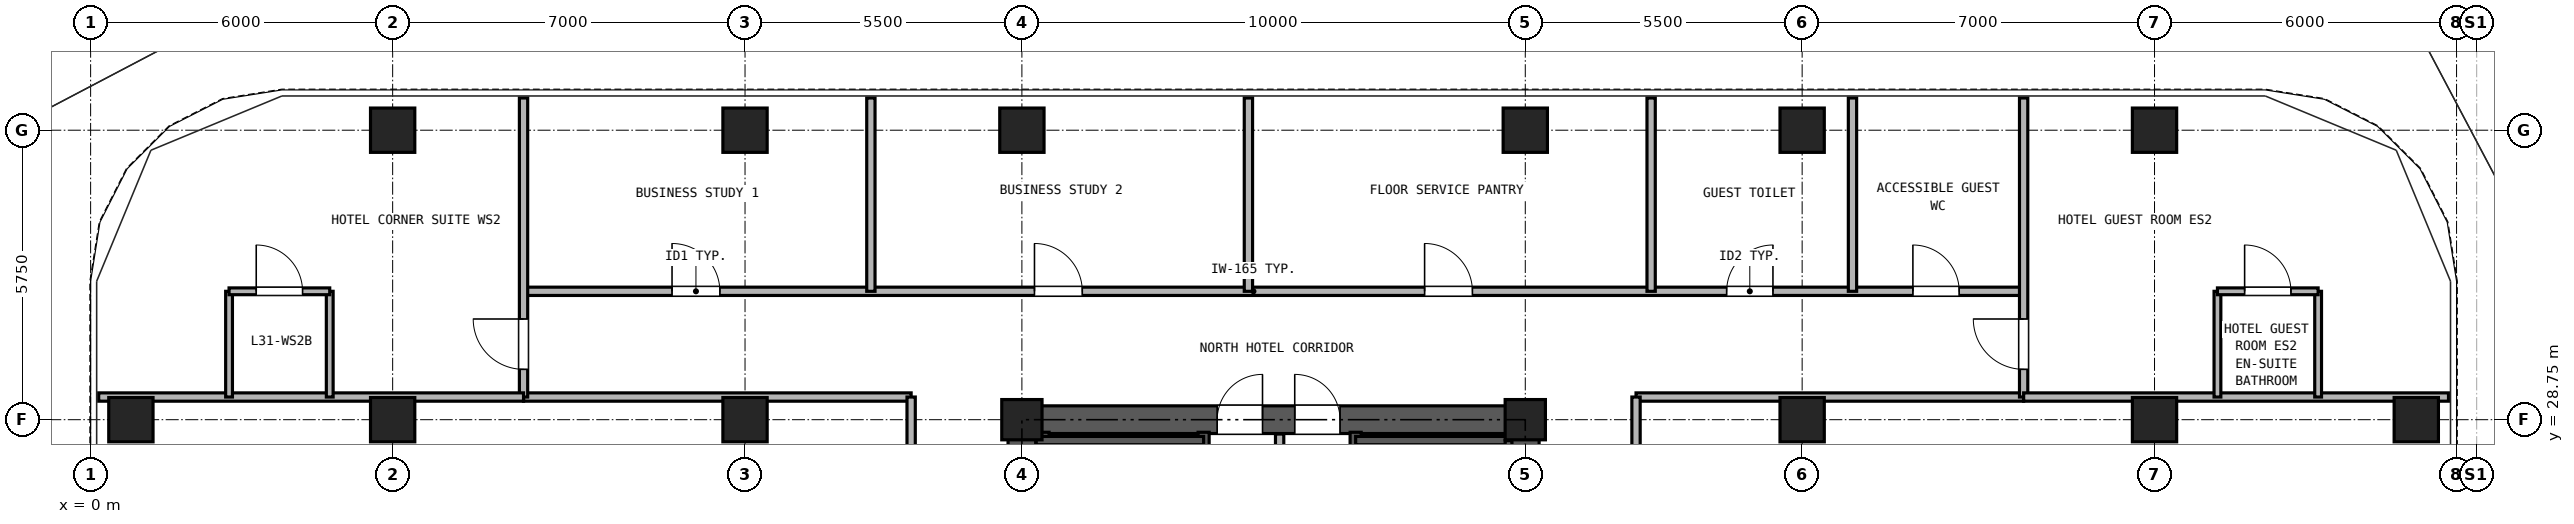
"""IFC4 building model, lengths in metres.
Left out: names, types, materials, properties, quantities, classifications, styles, units other than length and angle.
Written with IfcOpenShell. Run it as: python <this file> out.ifc"""

import sys

from ifc_helpers import new_model, si_unit, direction, frame, frame_2d, origin, origin_2d, place, context, subcontext, project, spatial, rectangle, hollow_rectangle, extrude, source, transform, mapped, element, fill, save


model = new_model("IFC4")
c1 = context("Model", 3, precision=1e-05, world=origin(), true_north=direction((0.0, 1.0)))
c2 = subcontext(c1, "Body", "Model", "MODEL_VIEW")
j1 = project(units=[si_unit("LENGTHUNIT", "METRE"), si_unit("PLANEANGLEUNIT", "RADIAN")], contexts=[c1])
p1 = place(None, origin())
s1 = spatial("IfcSite", under=j1, at=p1, CompositionType="ELEMENT")
p2 = place(p1, origin())
s2 = spatial("IfcBuilding", under=s1, at=p2, CompositionType="ELEMENT")
p3 = place(p2, frame((0.0, 0.0, 115.1)))
s3 = spatial("IfcBuildingStorey", under=s2, at=p3, CompositionType="ELEMENT", Elevation=115.1)
m1 = source(origin(), c2, "Body", "SweptSolid", [
    extrude(hollow_rectangle(XDim=0.88, YDim=0.88, WallThickness=0.05, at=origin_2d()), origin(), (0.0, 0.0, 1.0), 2.95),
])
for number, where, z_axis, x_axis in (
    (1, (6.0, 34.5, 0.0), (0.0, 0.0, 1.0), (1.0, 0.0, 0.0)),
    (2, (13.0, 34.5, 0.0), (0.0, 0.0, 1.0), (1.0, 0.0, 0.0)),
    (3, (18.5, 34.5, 0.0), (0.0, 0.0, 1.0), (1.0, 0.0, 0.0)),
    (4, (28.5, 34.5, 0.0), (0.0, 0.0, 1.0), (1.0, 0.0, 0.0)),
    (5, (34.0, 34.5, 0.0), (0.0, 0.0, 1.0), (1.0, 0.0, 0.0)),
    (6, (41.0, 34.5, 0.0), (0.0, 0.0, 1.0), (1.0, 0.0, 0.0)),
    (7, (0.8, 28.75, 0.0), (0.0, 0.0, 1.0), (1.0, 0.0, 0.0)),
    (8, (46.2, 28.75, 0.0), (0.0, 0.0, 1.0), (1.0, 0.0, 0.0)),
    (9, (6.0, 28.75, 0.0), (0.0, 0.0, 1.0), (1.0, 0.0, 0.0)),
    (10, (13.0, 28.75, 0.0), (0.0, 0.0, 1.0), (1.0, 0.0, 0.0)),
):
    element("IfcColumn", number, at=place(p3, frame(where, z_axis=z_axis, x_axis=x_axis)), inside=s3, PredefinedType="COLUMN", context=c2, shape_type="MappedRepresentation", body=[
        mapped(m1, transform((0.0, 0.0, 0.0), x_axis=(1.0, 0.0, 0.0), y_axis=(0.0, 1.0, 0.0), z_axis=(0.0, 0.0, 1.0), scale=1.0)),
    ])
m2 = source(origin(), c2, "Body", "SweptSolid", [
    extrude(hollow_rectangle(XDim=0.8, YDim=0.8, WallThickness=0.045, at=origin_2d()), origin(), (0.0, 0.0, 1.0), 2.95),
])
for number, where, z_axis, x_axis in (
    (11, (18.5, 28.75, 0.0), (0.0, 0.0, 1.0), (1.0, 0.0, 0.0)),
    (12, (28.5, 28.75, 0.0), (0.0, 0.0, 1.0), (1.0, 0.0, 0.0)),
):
    element("IfcColumn", number, at=place(p3, frame(where, z_axis=z_axis, x_axis=x_axis)), inside=s3, PredefinedType="COLUMN", context=c2, shape_type="MappedRepresentation", body=[
        mapped(m2, transform((0.0, 0.0, 0.0), x_axis=(1.0, 0.0, 0.0), y_axis=(0.0, 1.0, 0.0), z_axis=(0.0, 0.0, 1.0), scale=1.0)),
    ])
for number, where, z_axis, x_axis in (
    (13, (34.0, 28.75, 0.0), (0.0, 0.0, 1.0), (1.0, 0.0, 0.0)),
    (14, (41.0, 28.75, 0.0), (0.0, 0.0, 1.0), (1.0, 0.0, 0.0)),
):
    element("IfcColumn", number, at=place(p3, frame(where, z_axis=z_axis, x_axis=x_axis)), inside=s3, PredefinedType="COLUMN", context=c2, shape_type="MappedRepresentation", body=[
        mapped(m1, transform((0.0, 0.0, 0.0), x_axis=(1.0, 0.0, 0.0), y_axis=(0.0, 1.0, 0.0), z_axis=(0.0, 0.0, 1.0), scale=1.0)),
    ])
p4 = place(p3, frame((18.225, 28.75, 0.0), z_axis=(0.0, 0.0, 1.0), x_axis=(1.0, 0.0, 0.0)))
e15 = element("IfcWall", 15, at=p4, inside=s3, PredefinedType="SHEAR", context=c2, shape_type="SweptSolid", body=[
    extrude(rectangle(XDim=10.55, YDim=0.55, at=frame_2d((5.275, 0.0))), origin(), (0.0, 0.0, 1.0), 2.95),
])
p5 = place(p4, frame((4.155, 0.0, 0.0)))
e16 = element("IfcOpeningElement", 16, at=p5, cuts=e15, PredefinedType="OPENING", context=c2, shape_type="SweptSolid", body=[
    extrude(rectangle(XDim=0.9, YDim=2.05, at=frame_2d((0.45, 1.025))), frame((0.0, 0.285, 0.0), z_axis=(0.0, -1.0, 0.0), x_axis=(1.0, 0.0, 0.0)), (0.0, 0.0, 1.0), 0.57),
])
p6 = place(p4, frame((5.695, 0.0, 0.0)))
e17 = element("IfcOpeningElement", 17, at=p6, cuts=e15, PredefinedType="OPENING", context=c2, shape_type="SweptSolid", body=[
    extrude(rectangle(XDim=0.9, YDim=2.05, at=frame_2d((0.45, 1.025))), frame((0.0, 0.285, 0.0), z_axis=(0.0, -1.0, 0.0), x_axis=(1.0, 0.0, 0.0)), (0.0, 0.0, 1.0), 0.57),
])
p7 = place(p3, frame((18.5, 11.775, 0.0), z_axis=(0.0, 0.0, 1.0), x_axis=(0.0, 1.0, 0.0)))
e18 = element("IfcWall", 18, at=p7, inside=s3, PredefinedType="SHEAR", context=c2, shape_type="SweptSolid", body=[
    extrude(rectangle(XDim=16.7, YDim=0.55, at=frame_2d((8.35, 0.0))), origin(), (0.0, 0.0, 1.0), 2.95),
])
p8 = place(p7, frame((7.375, 0.0, 0.0)))
e19 = element("IfcOpeningElement", 19, at=p8, cuts=e18, PredefinedType="OPENING", context=c2, shape_type="SweptSolid", body=[
    extrude(rectangle(XDim=1.15, YDim=2.2, at=frame_2d((0.575, 1.1))), frame((0.0, 0.285, 0.0), z_axis=(0.0, -1.0, 0.0), x_axis=(1.0, 0.0, 0.0)), (0.0, 0.0, 1.0), 0.57),
])
p9 = place(p3, frame((28.5, 11.775, 0.0), z_axis=(0.0, 0.0, 1.0), x_axis=(0.0, 1.0, 0.0)))
e20 = element("IfcWall", 20, at=p9, inside=s3, PredefinedType="SHEAR", context=c2, shape_type="SweptSolid", body=[
    extrude(rectangle(XDim=16.7, YDim=0.55, at=frame_2d((8.35, 0.0))), origin(), (0.0, 0.0, 1.0), 2.95),
])
p10 = place(p9, frame((7.375, 0.0, 0.0)))
e21 = element("IfcOpeningElement", 21, at=p10, cuts=e20, PredefinedType="OPENING", context=c2, shape_type="SweptSolid", body=[
    extrude(rectangle(XDim=1.15, YDim=2.2, at=frame_2d((0.575, 1.1))), frame((0.0, 0.285, 0.0), z_axis=(0.0, -1.0, 0.0), x_axis=(1.0, 0.0, 0.0)), (0.0, 0.0, 1.0), 0.57),
])
for number, where, z_axis, x_axis in (
    (22, (18.93, 21.39, 0.0), (0.0, 0.0, 1.0), (0.0, 1.0, 0.0)),
    (23, (22.11, 21.39, 0.0), (0.0, 0.0, 1.0), (0.0, 1.0, 0.0)),
    (24, (25.13, 21.39, 0.0), (0.0, 0.0, 1.0), (0.0, 1.0, 0.0)),
):
    element("IfcWall", number, at=place(p3, frame(where, z_axis=z_axis, x_axis=x_axis)), inside=s3, PredefinedType="SOLIDWALL", context=c2, shape_type="SweptSolid", body=[
        extrude(rectangle(XDim=7.11, YDim=0.22, at=frame_2d((3.555, 0.0))), origin(), (0.0, 0.0, 1.0), 2.95),
    ])
p11 = place(p3, frame((18.785, 28.335, 0.0), z_axis=(0.0, 0.0, 1.0), x_axis=(1.0, 0.0, 0.0)))
e25 = element("IfcWall", 25, at=p11, inside=s3, PredefinedType="PARTITIONING", context=c2, shape_type="SweptSolid", body=[
    extrude(rectangle(XDim=3.325, YDim=0.165, at=frame_2d((1.663, 0.0))), origin(), (0.0, 0.0, 1.0), 2.95),
])
p12 = place(p3, frame((25.13, 28.335, 0.0), z_axis=(0.0, 0.0, 1.0), x_axis=(1.0, 0.0, 0.0)))
e26 = element("IfcWall", 26, at=p12, inside=s3, PredefinedType="PARTITIONING", context=c2, shape_type="SweptSolid", body=[
    extrude(rectangle(XDim=3.085, YDim=0.165, at=frame_2d((1.542, 0.0))), origin(), (0.0, 0.0, 1.0), 2.95),
])
p13 = place(p3, frame((28.167, 21.39, 0.0), z_axis=(0.0, 0.0, 1.0), x_axis=(0.0, 1.0, 0.0)))
e27 = element("IfcWall", 27, at=p13, inside=s3, PredefinedType="PARTITIONING", context=c2, shape_type="SweptSolid", body=[
    extrude(rectangle(XDim=6.945, YDim=0.135, at=frame_2d((3.473, 0.0))), origin(), (0.0, 0.0, 1.0), 2.95),
])
p14 = place(p3, frame((23.62, 24.4, 0.0), z_axis=(0.0, 0.0, 1.0), x_axis=(0.0, 1.0, 0.0)))
e28 = element("IfcWall", 28, at=p14, inside=s3, PredefinedType="PARTITIONING", context=c2, shape_type="SweptSolid", body=[
    extrude(rectangle(XDim=4.065, YDim=0.165, at=frame_2d((2.033, 0.0))), origin(), (0.0, 0.0, 1.0), 2.95),
])
p15 = place(p3, frame((8.6, 31.3, 0.0), z_axis=(0.0, 0.0, 1.0), x_axis=(1.0, 0.0, 0.0)))
e29 = element("IfcWall", 29, at=p15, inside=s3, PredefinedType="PARTITIONING", context=c2, shape_type="SweptSolid", body=[
    extrude(rectangle(XDim=29.8, YDim=0.165, at=frame_2d((14.9, 0.0))), origin(), (0.0, 0.0, 1.0), 2.95),
])
p16 = place(p15, frame((2.95, 0.0, 0.0)))
e30 = element("IfcOpeningElement", 30, at=p16, cuts=e29, PredefinedType="OPENING", context=c2, shape_type="SweptSolid", body=[
    extrude(rectangle(XDim=0.95, YDim=2.15, at=frame_2d((0.475, 1.075))), frame((0.0, 0.093, 0.0), z_axis=(0.0, -1.0, 0.0), x_axis=(1.0, 0.0, 0.0)), (0.0, 0.0, 1.0), 0.185),
])
p17 = place(p15, frame((10.15, 0.0, 0.0)))
e31 = element("IfcOpeningElement", 31, at=p17, cuts=e29, PredefinedType="OPENING", context=c2, shape_type="SweptSolid", body=[
    extrude(rectangle(XDim=0.95, YDim=2.15, at=frame_2d((0.475, 1.075))), frame((0.0, 0.093, 0.0), z_axis=(0.0, -1.0, 0.0), x_axis=(1.0, 0.0, 0.0)), (0.0, 0.0, 1.0), 0.185),
])
p18 = place(p15, frame((17.9, 0.0, 0.0)))
e32 = element("IfcOpeningElement", 32, at=p18, cuts=e29, PredefinedType="OPENING", context=c2, shape_type="SweptSolid", body=[
    extrude(rectangle(XDim=0.95, YDim=2.15, at=frame_2d((0.475, 1.075))), frame((0.0, 0.093, 0.0), z_axis=(0.0, -1.0, 0.0), x_axis=(1.0, 0.0, 0.0)), (0.0, 0.0, 1.0), 0.185),
])
p19 = place(p15, frame((23.9, 0.0, 0.0)))
e33 = element("IfcOpeningElement", 33, at=p19, cuts=e29, PredefinedType="OPENING", context=c2, shape_type="SweptSolid", body=[
    extrude(rectangle(XDim=0.92, YDim=2.1, at=frame_2d((0.46, 1.05))), frame((0.0, 0.093, 0.0), z_axis=(0.0, -1.0, 0.0), x_axis=(1.0, 0.0, 0.0)), (0.0, 0.0, 1.0), 0.185),
])
p20 = place(p15, frame((27.6, 0.0, 0.0)))
e34 = element("IfcOpeningElement", 34, at=p20, cuts=e29, PredefinedType="OPENING", context=c2, shape_type="SweptSolid", body=[
    extrude(rectangle(XDim=0.92, YDim=2.1, at=frame_2d((0.46, 1.05))), frame((0.0, 0.093, 0.0), z_axis=(0.0, -1.0, 0.0), x_axis=(1.0, 0.0, 0.0)), (0.0, 0.0, 1.0), 0.185),
])
for number, where, z_axis, x_axis in (
    (35, (8.6, 29.2, 0.0), (0.0, 0.0, 1.0), (1.0, 0.0, 0.0)),
    (36, (30.7, 29.2, 0.0), (0.0, 0.0, 1.0), (1.0, 0.0, 0.0)),
):
    element("IfcWall", number, at=place(p3, frame(where, z_axis=z_axis, x_axis=x_axis)), inside=s3, PredefinedType="PARTITIONING", context=c2, shape_type="SweptSolid", body=[
        extrude(rectangle(XDim=7.7, YDim=0.165, at=frame_2d((3.85, 0.0))), origin(), (0.0, 0.0, 1.0), 2.95),
    ])
p21 = place(p3, frame((16.3, 11.05, 0.0), z_axis=(0.0, 0.0, 1.0), x_axis=(0.0, 1.0, 0.0)))
e37 = element("IfcWall", 37, at=p21, inside=s3, PredefinedType="PARTITIONING", context=c2, shape_type="SweptSolid", body=[
    extrude(rectangle(XDim=18.15, YDim=0.165, at=frame_2d((9.075, 0.0))), origin(), (0.0, 0.0, 1.0), 2.95),
])
p22 = place(p21, frame((4.037, 0.0, 0.0)))
e38 = element("IfcOpeningElement", 38, at=p22, cuts=e37, PredefinedType="OPENING", context=c2, shape_type="SweptSolid", body=[
    extrude(rectangle(XDim=0.95, YDim=2.15, at=frame_2d((0.475, 1.075))), frame((0.0, 0.093, 0.0), z_axis=(0.0, -1.0, 0.0), x_axis=(1.0, 0.0, 0.0)), (0.0, 0.0, 1.0), 0.185),
])
p23 = place(p21, frame((13.113, 0.0, 0.0)))
e39 = element("IfcOpeningElement", 39, at=p23, cuts=e37, PredefinedType="OPENING", context=c2, shape_type="SweptSolid", body=[
    extrude(rectangle(XDim=0.95, YDim=2.15, at=frame_2d((0.475, 1.075))), frame((0.0, 0.093, 0.0), z_axis=(0.0, -1.0, 0.0), x_axis=(1.0, 0.0, 0.0)), (0.0, 0.0, 1.0), 0.185),
])
p24 = place(p3, frame((30.7, 11.05, 0.0), z_axis=(0.0, 0.0, 1.0), x_axis=(0.0, 1.0, 0.0)))
e40 = element("IfcWall", 40, at=p24, inside=s3, PredefinedType="PARTITIONING", context=c2, shape_type="SweptSolid", body=[
    extrude(rectangle(XDim=18.15, YDim=0.165, at=frame_2d((9.075, 0.0))), origin(), (0.0, 0.0, 1.0), 2.95),
])
p25 = place(p24, frame((8.575, 0.0, 0.0)))
e41 = element("IfcOpeningElement", 41, at=p25, cuts=e40, PredefinedType="OPENING", context=c2, shape_type="SweptSolid", body=[
    extrude(rectangle(XDim=0.95, YDim=2.15, at=frame_2d((0.475, 1.075))), frame((0.0, 0.093, 0.0), z_axis=(0.0, -1.0, 0.0), x_axis=(1.0, 0.0, 0.0)), (0.0, 0.0, 1.0), 0.185),
])
p26 = place(p3, frame((8.6, 29.2, 0.0), z_axis=(0.0, 0.0, 1.0), x_axis=(0.0, 1.0, 0.0)))
e42 = element("IfcWall", 42, at=p26, inside=s3, PredefinedType="PARTITIONING", context=c2, shape_type="SweptSolid", body=[
    extrude(rectangle(XDim=5.94, YDim=0.165, at=frame_2d((2.97, 0.0))), origin(), (0.0, 0.0, 1.0), 2.95),
])
p27 = place(p26, frame((0.55, 0.0, 0.0)))
e43 = element("IfcOpeningElement", 43, at=p27, cuts=e42, PredefinedType="OPENING", context=c2, shape_type="SweptSolid", body=[
    extrude(rectangle(XDim=1.0, YDim=2.15, at=frame_2d((0.5, 1.075))), frame((0.0, 0.093, 0.0), z_axis=(0.0, -1.0, 0.0), x_axis=(1.0, 0.0, 0.0)), (0.0, 0.0, 1.0), 0.185),
])
p28 = place(p3, frame((38.4, 29.2, 0.0), z_axis=(0.0, 0.0, 1.0), x_axis=(0.0, 1.0, 0.0)))
e44 = element("IfcWall", 44, at=p28, inside=s3, PredefinedType="PARTITIONING", context=c2, shape_type="SweptSolid", body=[
    extrude(rectangle(XDim=5.94, YDim=0.165, at=frame_2d((2.97, 0.0))), origin(), (0.0, 0.0, 1.0), 2.95),
])
p29 = place(p28, frame((0.55, 0.0, 0.0)))
e45 = element("IfcOpeningElement", 45, at=p29, cuts=e44, PredefinedType="OPENING", context=c2, shape_type="SweptSolid", body=[
    extrude(rectangle(XDim=1.0, YDim=2.15, at=frame_2d((0.5, 1.075))), frame((0.0, 0.093, 0.0), z_axis=(0.0, -1.0, 0.0), x_axis=(1.0, 0.0, 0.0)), (0.0, 0.0, 1.0), 0.185),
])
for number, where, z_axis, x_axis in (
    (46, (0.16, 29.2, 0.0), (0.0, 0.0, 1.0), (1.0, 0.0, 0.0)),
    (47, (38.4, 29.2, 0.0), (0.0, 0.0, 1.0), (1.0, 0.0, 0.0)),
):
    element("IfcWall", number, at=place(p3, frame(where, z_axis=z_axis, x_axis=x_axis)), inside=s3, PredefinedType="PARTITIONING", context=c2, shape_type="SweptSolid", body=[
        extrude(rectangle(XDim=8.44, YDim=0.165, at=frame_2d((4.22, 0.0))), origin(), (0.0, 0.0, 1.0), 2.95),
    ])
for number, where, z_axis, x_axis in (
    (48, (2.75, 29.2, 0.0), (0.0, 0.0, 1.0), (0.0, 1.0, 0.0)),
    (49, (4.75, 29.2, 0.0), (0.0, 0.0, 1.0), (0.0, 1.0, 0.0)),
):
    element("IfcWall", number, at=place(p3, frame(where, z_axis=z_axis, x_axis=x_axis)), inside=s3, PredefinedType="PARTITIONING", context=c2, shape_type="SweptSolid", body=[
        extrude(rectangle(XDim=2.1, YDim=0.135, at=frame_2d((1.05, 0.0))), origin(), (0.0, 0.0, 1.0), 2.95),
    ])
p30 = place(p3, frame((2.75, 31.3, 0.0), z_axis=(0.0, 0.0, 1.0), x_axis=(1.0, 0.0, 0.0)))
e50 = element("IfcWall", 50, at=p30, inside=s3, PredefinedType="PARTITIONING", context=c2, shape_type="SweptSolid", body=[
    extrude(rectangle(XDim=2.0, YDim=0.135, at=frame_2d((1.0, 0.0))), origin(), (0.0, 0.0, 1.0), 2.95),
])
p31 = place(p30, frame((0.54, 0.0, 0.0)))
e51 = element("IfcOpeningElement", 51, at=p31, cuts=e50, PredefinedType="OPENING", context=c2, shape_type="SweptSolid", body=[
    extrude(rectangle(XDim=0.92, YDim=2.1, at=frame_2d((0.46, 1.05))), frame((0.0, 0.077, 0.0), z_axis=(0.0, -1.0, 0.0), x_axis=(1.0, 0.0, 0.0)), (0.0, 0.0, 1.0), 0.155),
])
for number, where, z_axis, x_axis in (
    (52, (42.25, 29.2, 0.0), (0.0, 0.0, 1.0), (0.0, 1.0, 0.0)),
    (53, (44.25, 29.2, 0.0), (0.0, 0.0, 1.0), (0.0, 1.0, 0.0)),
):
    element("IfcWall", number, at=place(p3, frame(where, z_axis=z_axis, x_axis=x_axis)), inside=s3, PredefinedType="PARTITIONING", context=c2, shape_type="SweptSolid", body=[
        extrude(rectangle(XDim=2.1, YDim=0.135, at=frame_2d((1.05, 0.0))), origin(), (0.0, 0.0, 1.0), 2.95),
    ])
p32 = place(p3, frame((42.25, 31.3, 0.0), z_axis=(0.0, 0.0, 1.0), x_axis=(1.0, 0.0, 0.0)))
e54 = element("IfcWall", 54, at=p32, inside=s3, PredefinedType="PARTITIONING", context=c2, shape_type="SweptSolid", body=[
    extrude(rectangle(XDim=2.0, YDim=0.135, at=frame_2d((1.0, 0.0))), origin(), (0.0, 0.0, 1.0), 2.95),
])
p33 = place(p32, frame((0.54, 0.0, 0.0)))
e55 = element("IfcOpeningElement", 55, at=p33, cuts=e54, PredefinedType="OPENING", context=c2, shape_type="SweptSolid", body=[
    extrude(rectangle(XDim=0.92, YDim=2.1, at=frame_2d((0.46, 1.05))), frame((0.0, 0.077, 0.0), z_axis=(0.0, -1.0, 0.0), x_axis=(1.0, 0.0, 0.0)), (0.0, 0.0, 1.0), 0.155),
])
for number, where, z_axis, x_axis in (
    (56, (15.5, 31.3, 0.0), (0.0, 0.0, 1.0), (0.0, 1.0, 0.0)),
    (57, (23.0, 31.3, 0.0), (0.0, 0.0, 1.0), (0.0, 1.0, 0.0)),
    (58, (31.0, 31.3, 0.0), (0.0, 0.0, 1.0), (0.0, 1.0, 0.0)),
    (59, (35.0, 31.3, 0.0), (0.0, 0.0, 1.0), (0.0, 1.0, 0.0)),
):
    element("IfcWall", number, at=place(p3, frame(where, z_axis=z_axis, x_axis=x_axis)), inside=s3, PredefinedType="PARTITIONING", context=c2, shape_type="SweptSolid", body=[
        extrude(rectangle(XDim=3.84, YDim=0.165, at=frame_2d((1.92, 0.0))), origin(), (0.0, 0.0, 1.0), 2.95),
    ])
p34 = place(p5, origin())
e60 = element("IfcDoor", 60, at=p34, inside=s3, OperationType="SINGLE_SWING_RIGHT", PredefinedType="DOOR", context=c2, shape_type="SweptSolid", body=[
    extrude(rectangle(XDim=0.9, YDim=2.05, at=frame_2d((0.45, 1.025))), frame((0.0, 0.025, 0.0), z_axis=(0.0, -1.0, 0.0), x_axis=(1.0, 0.0, 0.0)), (0.0, 0.0, 1.0), 0.05),
])
fill(e16, e60)
p35 = place(p6, origin())
e61 = element("IfcDoor", 61, at=p35, inside=s3, OperationType="SINGLE_SWING_LEFT", PredefinedType="DOOR", context=c2, shape_type="SweptSolid", body=[
    extrude(rectangle(XDim=0.9, YDim=2.05, at=frame_2d((0.45, 1.025))), frame((0.0, 0.025, 0.0), z_axis=(0.0, -1.0, 0.0), x_axis=(1.0, 0.0, 0.0)), (0.0, 0.0, 1.0), 0.05),
])
fill(e17, e61)
p36 = place(p31, frame((0.92, 0.0, 0.0), z_axis=(0.0, 0.0, 1.0), x_axis=(-1.0, 0.0, 0.0)))
e62 = element("IfcDoor", 62, at=p36, inside=s3, OperationType="SINGLE_SWING_LEFT", PredefinedType="DOOR", context=c2, shape_type="SweptSolid", body=[
    extrude(rectangle(XDim=0.92, YDim=2.1, at=frame_2d((0.46, 1.05))), frame((0.0, 0.025, 0.0), z_axis=(0.0, -1.0, 0.0), x_axis=(1.0, 0.0, 0.0)), (0.0, 0.0, 1.0), 0.05),
])
fill(e51, e62)
p37 = place(p27, origin())
e63 = element("IfcDoor", 63, at=p37, inside=s3, OperationType="SINGLE_SWING_RIGHT", PredefinedType="DOOR", context=c2, shape_type="SweptSolid", body=[
    extrude(rectangle(XDim=1.0, YDim=2.15, at=frame_2d((0.5, 1.075))), frame((0.0, 0.025, 0.0), z_axis=(0.0, -1.0, 0.0), x_axis=(1.0, 0.0, 0.0)), (0.0, 0.0, 1.0), 0.05),
])
fill(e43, e63)
p38 = place(p33, frame((0.92, 0.0, 0.0), z_axis=(0.0, 0.0, 1.0), x_axis=(-1.0, 0.0, 0.0)))
e64 = element("IfcDoor", 64, at=p38, inside=s3, OperationType="SINGLE_SWING_LEFT", PredefinedType="DOOR", context=c2, shape_type="SweptSolid", body=[
    extrude(rectangle(XDim=0.92, YDim=2.1, at=frame_2d((0.46, 1.05))), frame((0.0, 0.025, 0.0), z_axis=(0.0, -1.0, 0.0), x_axis=(1.0, 0.0, 0.0)), (0.0, 0.0, 1.0), 0.05),
])
fill(e55, e64)
p39 = place(p29, frame((1.0, 0.0, 0.0), z_axis=(0.0, 0.0, 1.0), x_axis=(-1.0, 0.0, 0.0)))
e65 = element("IfcDoor", 65, at=p39, inside=s3, OperationType="SINGLE_SWING_RIGHT", PredefinedType="DOOR", context=c2, shape_type="SweptSolid", body=[
    extrude(rectangle(XDim=1.0, YDim=2.15, at=frame_2d((0.5, 1.075))), frame((0.0, 0.025, 0.0), z_axis=(0.0, -1.0, 0.0), x_axis=(1.0, 0.0, 0.0)), (0.0, 0.0, 1.0), 0.05),
])
fill(e45, e65)
p40 = place(p16, origin())
e66 = element("IfcDoor", 66, at=p40, inside=s3, OperationType="SINGLE_SWING_LEFT", PredefinedType="DOOR", context=c2, shape_type="SweptSolid", body=[
    extrude(rectangle(XDim=0.95, YDim=2.15, at=frame_2d((0.475, 1.075))), frame((0.0, 0.025, 0.0), z_axis=(0.0, -1.0, 0.0), x_axis=(1.0, 0.0, 0.0)), (0.0, 0.0, 1.0), 0.05),
])
fill(e30, e66)
p41 = place(p17, origin())
e67 = element("IfcDoor", 67, at=p41, inside=s3, OperationType="SINGLE_SWING_LEFT", PredefinedType="DOOR", context=c2, shape_type="SweptSolid", body=[
    extrude(rectangle(XDim=0.95, YDim=2.15, at=frame_2d((0.475, 1.075))), frame((0.0, 0.025, 0.0), z_axis=(0.0, -1.0, 0.0), x_axis=(1.0, 0.0, 0.0)), (0.0, 0.0, 1.0), 0.05),
])
fill(e31, e67)
p42 = place(p18, origin())
e68 = element("IfcDoor", 68, at=p42, inside=s3, OperationType="SINGLE_SWING_LEFT", PredefinedType="DOOR", context=c2, shape_type="SweptSolid", body=[
    extrude(rectangle(XDim=0.95, YDim=2.15, at=frame_2d((0.475, 1.075))), frame((0.0, 0.025, 0.0), z_axis=(0.0, -1.0, 0.0), x_axis=(1.0, 0.0, 0.0)), (0.0, 0.0, 1.0), 0.05),
])
fill(e32, e68)
p43 = place(p19, origin())
e69 = element("IfcDoor", 69, at=p43, inside=s3, OperationType="SINGLE_SWING_RIGHT", PredefinedType="DOOR", context=c2, shape_type="SweptSolid", body=[
    extrude(rectangle(XDim=0.92, YDim=2.1, at=frame_2d((0.46, 1.05))), frame((0.0, 0.025, 0.0), z_axis=(0.0, -1.0, 0.0), x_axis=(1.0, 0.0, 0.0)), (0.0, 0.0, 1.0), 0.05),
])
fill(e33, e69)
p44 = place(p20, origin())
e70 = element("IfcDoor", 70, at=p44, inside=s3, OperationType="SINGLE_SWING_LEFT", PredefinedType="DOOR", context=c2, shape_type="SweptSolid", body=[
    extrude(rectangle(XDim=0.92, YDim=2.1, at=frame_2d((0.46, 1.05))), frame((0.0, 0.025, 0.0), z_axis=(0.0, -1.0, 0.0), x_axis=(1.0, 0.0, 0.0)), (0.0, 0.0, 1.0), 0.05),
])
fill(e34, e70)
save(model, sys.argv[1])
